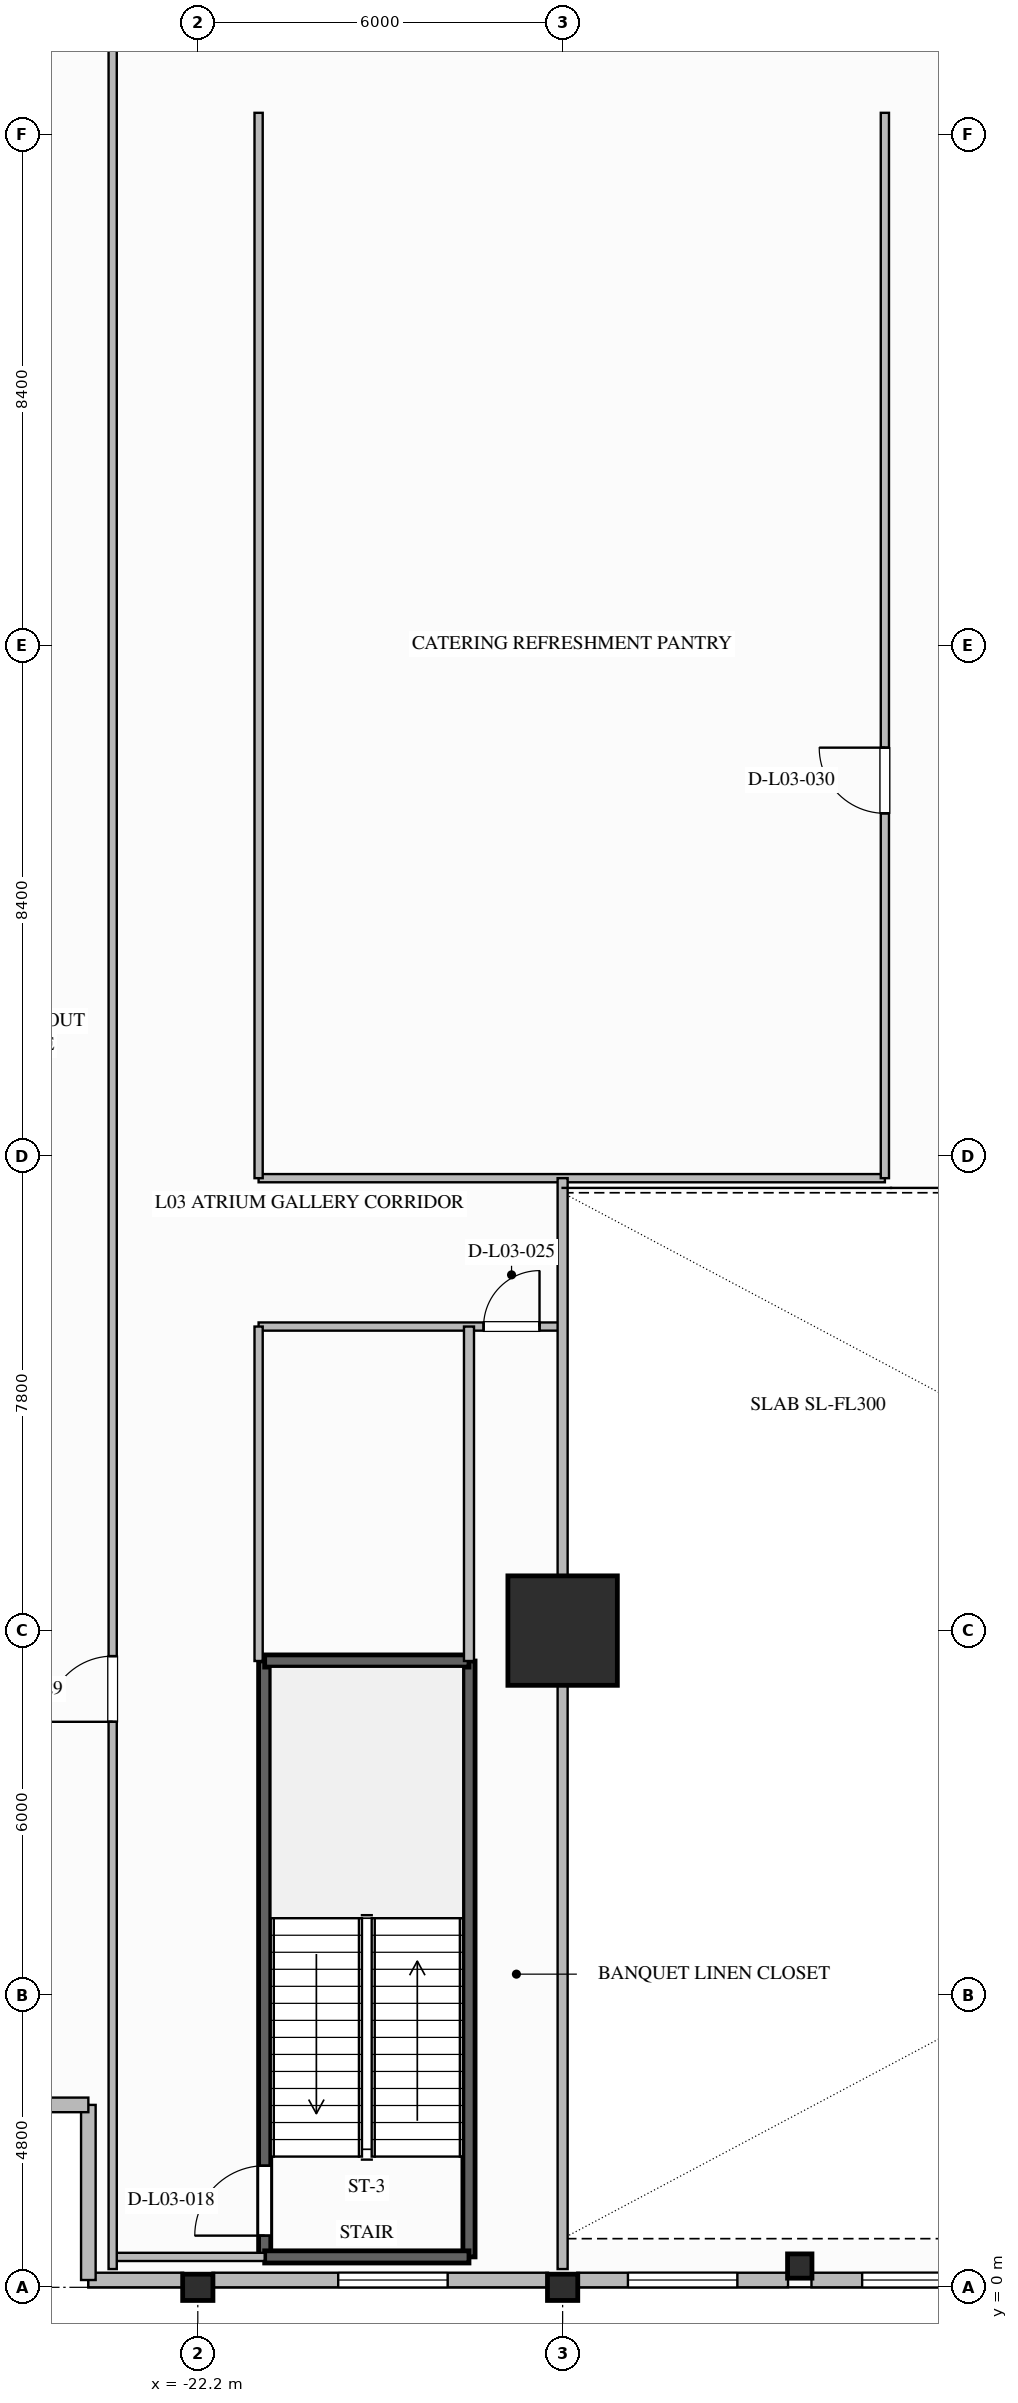
"""IFC4 building model, lengths in metres.
Left out: names, types, materials, properties, quantities, classifications, styles, units other than length and angle.
Written with IfcOpenShell. Run it as: python <this file> out.ifc"""

import sys

from ifc_helpers import new_model, si_unit, direction, frame, frame_2d, origin, origin_2d, place, context, subcontext, project, spatial, rectangle, i_section, extrude, element, fill, save


model = new_model("IFC4")
c1 = context("Model", 3, precision=1e-05, world=origin(), true_north=direction((0.0, 1.0)))
c2 = subcontext(c1, "Body", "Model", "MODEL_VIEW")
j1 = project(units=[si_unit("LENGTHUNIT", "METRE"), si_unit("PLANEANGLEUNIT", "RADIAN")], contexts=[c1])
p1 = place(None, origin())
s1 = spatial("IfcSite", under=j1, at=p1, CompositionType="ELEMENT")
p2 = place(p1, origin())
s2 = spatial("IfcBuilding", under=s1, at=p2, CompositionType="ELEMENT")
p3 = place(p2, frame((0.0, 0.0, 17.2)))
s3 = spatial("IfcBuildingStorey", under=s2, at=p3, CompositionType="ELEMENT", Elevation=17.2)
p4 = place(p3, frame((-16.2, 10.8, 0.0), z_axis=(0.0, 0.0, 1.0), x_axis=(1.0, 0.0, 0.0)))
e1 = element("IfcColumn", 1, at=p4, inside=s3, PredefinedType="COLUMN", context=c2, shape_type="SweptSolid", body=[
    extrude(rectangle(XDim=1.8, YDim=1.8, at=origin_2d()), origin(), (0.0, 0.0, 1.0), 5.2),
])
for number, where, z_axis, x_axis in (
    (2, (-22.2, 0.0, 0.0), (0.0, 0.0, 1.0), (0.0, 1.0, 0.0)),
    (3, (-16.2, 0.0, 0.0), (0.0, 0.0, 1.0), (0.0, 1.0, 0.0)),
):
    element("IfcColumn", number, at=place(p3, frame(where, z_axis=z_axis, x_axis=x_axis)), inside=s3, PredefinedType="COLUMN", context=c2, shape_type="SweptSolid", body=[
        extrude(i_section(OverallWidth=0.432, OverallDepth=0.498, WebThickness=0.056, FlangeThickness=0.089, FilletRadius=0.03, at=origin_2d()), origin(), (0.0, 0.0, 1.0), 5.2),
    ])
p5 = place(p3, frame((-12.3, 0.35, 0.0), z_axis=(0.0, 0.0, 1.0), x_axis=(1.0, 0.0, 0.0)))
e4 = element("IfcColumn", 4, at=p5, inside=s3, PredefinedType="COLUMN", context=c2, shape_type="SweptSolid", body=[
    extrude(i_section(OverallWidth=0.401, OverallDepth=0.399, WebThickness=0.025, FlangeThickness=0.04, FilletRadius=0.025, at=origin_2d()), origin(), (0.0, 0.0, 1.0), 5.2),
])
p6 = place(p3, frame((-22.441, 0.12, 0.0), z_axis=(0.0, 0.0, 1.0), x_axis=(-1.0, 0.0, 0.0)))
e5 = element("IfcWall", 5, at=p6, inside=s3, PredefinedType="STANDARD", context=c2, shape_type="SweptSolid", body=[
    extrude(rectangle(XDim=1.559, YDim=0.24, at=frame_2d((0.78, 0.0))), origin(), (0.0, 0.0, 1.0), 4.9),
])
p7 = place(p3, frame((-16.441, 0.12, 0.0), z_axis=(0.0, 0.0, 1.0), x_axis=(-1.0, 0.0, 0.0)))
e6 = element("IfcWall", 6, at=p7, inside=s3, PredefinedType="STANDARD", context=c2, shape_type="SweptSolid", body=[
    extrude(rectangle(XDim=5.518, YDim=0.24, at=frame_2d((2.759, 0.0))), origin(), (0.0, 0.0, 1.0), 4.205),
])
p8 = place(p7, frame((1.65, 0.0, 0.65)))
e7 = element("IfcOpeningElement", 7, at=p8, cuts=e6, PredefinedType="OPENING", context=c2, shape_type="SweptSolid", body=[
    extrude(rectangle(XDim=1.8, YDim=2.2, at=frame_2d((0.9, 1.1))), frame((0.0, 0.13, 0.0), z_axis=(0.0, -1.0, 0.0), x_axis=(1.0, 0.0, 0.0)), (0.0, 0.0, 1.0), 0.26),
])
p9 = place(p3, frame((-12.493, 0.12, 0.0), z_axis=(0.0, 0.0, 1.0), x_axis=(-1.0, 0.0, 0.0)))
e8 = element("IfcWall", 8, at=p9, inside=s3, PredefinedType="STANDARD", context=c2, shape_type="SweptSolid", body=[
    extrude(rectangle(XDim=3.466, YDim=0.24, at=frame_2d((1.733, 0.0))), origin(), (0.0, 0.0, 1.0), 4.205),
])
p10 = place(p9, frame((0.833, 0.0, 0.65)))
e9 = element("IfcOpeningElement", 9, at=p10, cuts=e8, PredefinedType="OPENING", context=c2, shape_type="SweptSolid", body=[
    extrude(rectangle(XDim=1.8, YDim=2.2, at=frame_2d((0.9, 1.1))), frame((0.0, 0.13, 0.0), z_axis=(0.0, -1.0, 0.0), x_axis=(1.0, 0.0, 0.0)), (0.0, 0.0, 1.0), 0.26),
])
p11 = place(p3, frame((-8.641, 0.12, 0.0), z_axis=(0.0, 0.0, 1.0), x_axis=(-1.0, 0.0, 0.0)))
e10 = element("IfcWall", 10, at=p11, inside=s3, PredefinedType="STANDARD", context=c2, shape_type="SweptSolid", body=[
    extrude(rectangle(XDim=3.467, YDim=0.24, at=frame_2d((1.733, 0.0))), origin(), (0.0, 0.0, 1.0), 4.205),
])
p12 = place(p11, frame((0.833, 0.0, 0.65)))
e11 = element("IfcOpeningElement", 11, at=p12, cuts=e10, PredefinedType="OPENING", context=c2, shape_type="SweptSolid", body=[
    extrude(rectangle(XDim=1.8, YDim=2.2, at=frame_2d((0.9, 1.1))), frame((0.0, 0.13, 0.0), z_axis=(0.0, -1.0, 0.0), x_axis=(1.0, 0.0, 0.0)), (0.0, 0.0, 1.0), 0.26),
])
for number, where, z_axis, x_axis in (
    (12, (-24.0, 0.12, 0.0), (0.0, 0.0, 1.0), (0.0, 1.0, 0.0)),
    (13, (-24.0, 3.0, 0.0), (0.0, 0.0, 1.0), (-1.0, 0.0, 0.0)),
):
    element("IfcWall", number, at=place(p3, frame(where, z_axis=z_axis, x_axis=x_axis)), inside=s3, PredefinedType="STANDARD", context=c2, shape_type="SweptSolid", body=[
        extrude(rectangle(XDim=2.88, YDim=0.24, at=frame_2d((1.44, 0.0))), origin(), (0.0, 0.0, 1.0), 4.9),
    ])
p13 = place(p3, frame((-21.1, 0.5, 0.0), z_axis=(0.0, 0.0, 1.0), x_axis=(0.0, 1.0, 0.0)))
e14 = element("IfcWall", 14, at=p13, inside=s3, PredefinedType="SOLIDWALL", context=c2, shape_type="SweptSolid", body=[
    extrude(rectangle(XDim=9.8, YDim=0.2, at=frame_2d((4.9, 0.0))), origin(), (0.0, 0.0, 1.0), 4.9),
])
p14 = place(p13, frame((0.35, 0.0, 0.0)))
e15 = element("IfcOpeningElement", 15, at=p14, cuts=e14, PredefinedType="OPENING", context=c2, shape_type="SweptSolid", body=[
    extrude(rectangle(XDim=1.15, YDim=2.15, at=frame_2d((0.575, 1.075))), frame((0.0, 0.11, 0.0), z_axis=(0.0, -1.0, 0.0), x_axis=(1.0, 0.0, 0.0)), (0.0, 0.0, 1.0), 0.22),
])
p15 = place(p3, frame((-17.74, 10.3, 0.0), z_axis=(0.0, 0.0, 1.0), x_axis=(0.0, -1.0, 0.0)))
e16 = element("IfcWall", 16, at=p15, inside=s3, PredefinedType="SOLIDWALL", context=c2, shape_type="SweptSolid", body=[
    extrude(rectangle(XDim=9.8, YDim=0.2, at=frame_2d((4.9, 0.0))), origin(), (0.0, 0.0, 1.0), 4.9),
])
for number, where, z_axis, x_axis in (
    (17, (-21.1, 0.5, 0.0), (0.0, 0.0, 1.0), (1.0, 0.0, 0.0)),
    (18, (-17.74, 10.3, 0.0), (0.0, 0.0, 1.0), (-1.0, 0.0, 0.0)),
):
    element("IfcWall", number, at=place(p3, frame(where, z_axis=z_axis, x_axis=x_axis)), inside=s3, PredefinedType="SOLIDWALL", context=c2, shape_type="SweptSolid", body=[
        extrude(rectangle(XDim=3.36, YDim=0.2, at=frame_2d((1.68, 0.0))), origin(), (0.0, 0.0, 1.0), 4.9),
    ])
p16 = place(p3, frame((-21.2, 15.8, 0.0), z_axis=(0.0, 0.0, 1.0), x_axis=(1.0, 0.0, 0.0)))
e19 = element("IfcWall", 19, at=p16, inside=s3, PredefinedType="PARTITIONING", context=c2, shape_type="SweptSolid", body=[
    extrude(rectangle(XDim=5.0, YDim=0.135, at=frame_2d((2.5, 0.0))), origin(), (0.0, 0.0, 1.0), 4.9),
])
p17 = place(p16, frame((3.7, 0.0, 0.0)))
e20 = element("IfcOpeningElement", 20, at=p17, cuts=e19, PredefinedType="OPENING", context=c2, shape_type="SweptSolid", body=[
    extrude(rectangle(XDim=0.92, YDim=2.1, at=frame_2d((0.46, 1.05))), frame((0.0, 0.077, 0.0), z_axis=(0.0, -1.0, 0.0), x_axis=(1.0, 0.0, 0.0)), (0.0, 0.0, 1.0), 0.155),
])
p18 = place(p3, frame((-21.2, 18.24, 0.0), z_axis=(0.0, 0.0, 1.0), x_axis=(1.0, 0.0, 0.0)))
e21 = element("IfcWall", 21, at=p18, inside=s3, PredefinedType="PARTITIONING", context=c2, shape_type="SweptSolid", body=[
    extrude(rectangle(XDim=10.3, YDim=0.135, at=frame_2d((5.15, 0.0))), origin(), (0.0, 0.0, 1.0), 4.9),
])
p19 = place(p3, frame((-10.9, 18.24, 0.0), z_axis=(0.0, 0.0, 1.0), x_axis=(0.0, 1.0, 0.0)))
e22 = element("IfcWall", 22, at=p19, inside=s3, PredefinedType="PARTITIONING", context=c2, shape_type="SweptSolid", body=[
    extrude(rectangle(XDim=17.52, YDim=0.135, at=frame_2d((8.76, 0.0))), origin(), (0.0, 0.0, 1.0), 4.9),
])
p20 = place(p19, frame((6.0, 0.0, 0.0)))
e23 = element("IfcOpeningElement", 23, at=p20, cuts=e22, PredefinedType="OPENING", context=c2, shape_type="SweptSolid", body=[
    extrude(rectangle(XDim=1.08, YDim=2.04, at=frame_2d((0.54, 1.02))), frame((0.0, 0.077, 0.0), z_axis=(0.0, -1.0, 0.0), x_axis=(1.0, 0.0, 0.0)), (0.0, 0.0, 1.0), 0.155),
])
p21 = place(p3, frame((-17.74, 10.3, 0.0), z_axis=(0.0, 0.0, 1.0), x_axis=(0.0, 1.0, 0.0)))
e24 = element("IfcWall", 24, at=p21, inside=s3, PredefinedType="PARTITIONING", context=c2, shape_type="SweptSolid", body=[
    extrude(rectangle(XDim=5.5, YDim=0.165, at=frame_2d((2.75, 0.0))), origin(), (0.0, 0.0, 1.0), 4.9),
])
p22 = place(p3, frame((-21.2, 10.3, 0.0), z_axis=(0.0, 0.0, 1.0), x_axis=(0.0, 1.0, 0.0)))
e25 = element("IfcWall", 25, at=p22, inside=s3, PredefinedType="PARTITIONING", context=c2, shape_type="SweptSolid", body=[
    extrude(rectangle(XDim=5.5, YDim=0.135, at=frame_2d((2.75, 0.0))), origin(), (0.0, 0.0, 1.0), 4.9),
])
p23 = place(p3, frame((-21.2, 18.24, 0.0), z_axis=(0.0, 0.0, 1.0), x_axis=(0.0, 1.0, 0.0)))
e26 = element("IfcWall", 26, at=p23, inside=s3, PredefinedType="PARTITIONING", context=c2, shape_type="SweptSolid", body=[
    extrude(rectangle(XDim=17.52, YDim=0.135, at=frame_2d((8.76, 0.0))), origin(), (0.0, 0.0, 1.0), 4.9),
])
p24 = place(p3, frame((-23.6, 0.5, 0.0), z_axis=(0.0, 0.0, 1.0), x_axis=(1.0, 0.0, 0.0)))
e27 = element("IfcWall", 27, at=p24, inside=s3, PredefinedType="PARTITIONING", context=c2, shape_type="SweptSolid", body=[
    extrude(rectangle(XDim=2.5, YDim=0.135, at=frame_2d((1.25, 0.0))), origin(), (0.0, 0.0, 1.0), 4.9),
])
p25 = place(p3, frame((-23.6, 0.3, 0.0), z_axis=(0.0, 0.0, 1.0), x_axis=(0.0, 1.0, 0.0)))
e28 = element("IfcWall", 28, at=p25, inside=s3, PredefinedType="PARTITIONING", context=c2, shape_type="SweptSolid", body=[
    extrude(rectangle(XDim=37.9, YDim=0.135, at=frame_2d((18.95, 0.0))), origin(), (0.0, 0.0, 1.0), 4.9),
])
p26 = place(p25, frame((9.0, 0.0, 0.0)))
e29 = element("IfcOpeningElement", 29, at=p26, cuts=e28, PredefinedType="OPENING", context=c2, shape_type="SweptSolid", body=[
    extrude(rectangle(XDim=1.08, YDim=2.04, at=frame_2d((0.54, 1.02))), frame((0.0, 0.077, 0.0), z_axis=(0.0, -1.0, 0.0), x_axis=(1.0, 0.0, 0.0)), (0.0, 0.0, 1.0), 0.155),
])
p27 = place(p3, frame((-16.2, 0.3, 0.0), z_axis=(0.0, 0.0, 1.0), x_axis=(0.0, 1.0, 0.0)))
e30 = element("IfcWall", 30, at=p27, inside=s3, PredefinedType="PARTITIONING", context=c2, shape_type="SweptSolid", body=[
    extrude(rectangle(XDim=17.94, YDim=0.165, at=frame_2d((8.97, 0.0))), origin(), (0.0, 0.0, 1.0), 3.937),
])
p28 = place(p8, origin())
e31 = element("IfcWindow", 31, at=p28, inside=s3, PartitioningType="SINGLE_PANEL", PredefinedType="WINDOW", context=c2, shape_type="SweptSolid", body=[
    extrude(rectangle(XDim=1.8, YDim=2.2, at=frame_2d((0.9, 1.1))), frame((0.0, 0.03, 0.0), z_axis=(0.0, -1.0, 0.0), x_axis=(1.0, 0.0, 0.0)), (0.0, 0.0, 1.0), 0.06),
])
fill(e7, e31)
p29 = place(p10, origin())
e32 = element("IfcWindow", 32, at=p29, inside=s3, PartitioningType="SINGLE_PANEL", PredefinedType="WINDOW", context=c2, shape_type="SweptSolid", body=[
    extrude(rectangle(XDim=1.8, YDim=2.2, at=frame_2d((0.9, 1.1))), frame((0.0, 0.03, 0.0), z_axis=(0.0, -1.0, 0.0), x_axis=(1.0, 0.0, 0.0)), (0.0, 0.0, 1.0), 0.06),
])
fill(e9, e32)
p30 = place(p12, origin())
e33 = element("IfcWindow", 33, at=p30, inside=s3, PartitioningType="SINGLE_PANEL", PredefinedType="WINDOW", context=c2, shape_type="SweptSolid", body=[
    extrude(rectangle(XDim=1.8, YDim=2.2, at=frame_2d((0.9, 1.1))), frame((0.0, 0.03, 0.0), z_axis=(0.0, -1.0, 0.0), x_axis=(1.0, 0.0, 0.0)), (0.0, 0.0, 1.0), 0.06),
])
fill(e11, e33)
p31 = place(p14, origin())
e34 = element("IfcDoor", 34, at=p31, inside=s3, OperationType="SINGLE_SWING_LEFT", PredefinedType="DOOR", context=c2, shape_type="SweptSolid", body=[
    extrude(rectangle(XDim=1.15, YDim=2.15, at=frame_2d((0.575, 1.075))), frame((0.0, 0.025, 0.0), z_axis=(0.0, -1.0, 0.0), x_axis=(1.0, 0.0, 0.0)), (0.0, 0.0, 1.0), 0.05),
])
fill(e15, e34)
p32 = place(p17, origin())
e35 = element("IfcDoor", 35, at=p32, inside=s3, OperationType="SINGLE_SWING_RIGHT", PredefinedType="DOOR", context=c2, shape_type="SweptSolid", body=[
    extrude(rectangle(XDim=0.92, YDim=2.1, at=frame_2d((0.46, 1.05))), frame((0.0, 0.025, 0.0), z_axis=(0.0, -1.0, 0.0), x_axis=(1.0, 0.0, 0.0)), (0.0, 0.0, 1.0), 0.05),
])
fill(e20, e35)
p33 = place(p26, origin())
e36 = element("IfcDoor", 36, at=p33, inside=s3, OperationType="SINGLE_SWING_LEFT", PredefinedType="DOOR", context=c2, shape_type="SweptSolid", body=[
    extrude(rectangle(XDim=1.08, YDim=2.04, at=frame_2d((0.54, 1.02))), frame((0.0, 0.025, 0.0), z_axis=(0.0, -1.0, 0.0), x_axis=(1.0, 0.0, 0.0)), (0.0, 0.0, 1.0), 0.05),
])
fill(e29, e36)
p34 = place(p20, origin())
e37 = element("IfcDoor", 37, at=p34, inside=s3, OperationType="SINGLE_SWING_RIGHT", PredefinedType="DOOR", context=c2, shape_type="SweptSolid", body=[
    extrude(rectangle(XDim=1.08, YDim=2.04, at=frame_2d((0.54, 1.02))), frame((0.0, 0.025, 0.0), z_axis=(0.0, -1.0, 0.0), x_axis=(1.0, 0.0, 0.0)), (0.0, 0.0, 1.0), 0.05),
])
fill(e23, e37)
save(model, sys.argv[1])
